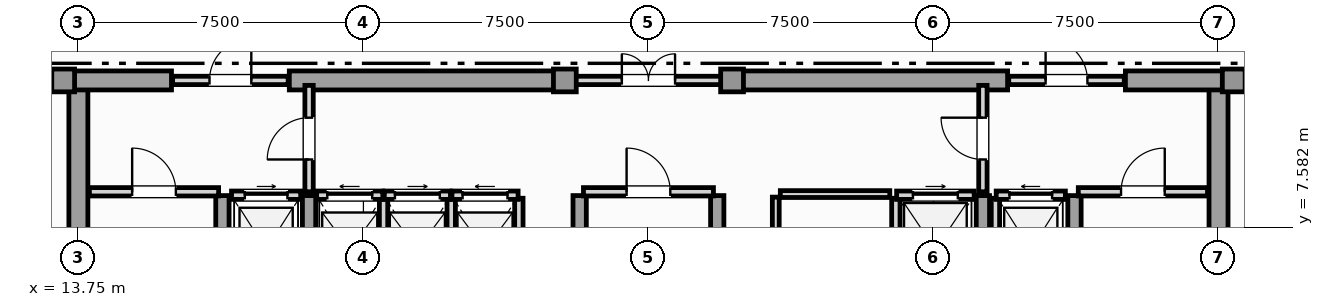
"""IFC4 building model, lengths in metres.
Left out: names, types, materials, properties, quantities, classifications, styles, units other than length and angle.
Written with IfcOpenShell. Run it as: python <this file> out.ifc"""

import sys

from ifc_helpers import new_model, si_unit, direction, frame, frame_2d, origin, origin_2d, place, context, subcontext, project, spatial, rectangle, extrude, element, fill, save


model = new_model("IFC4")
c1 = context("Model", 3, precision=1e-05, world=origin(), true_north=direction((0.0, 1.0)))
c2 = subcontext(c1, "Body", "Model", "MODEL_VIEW")
j1 = project(units=[si_unit("LENGTHUNIT", "METRE"), si_unit("PLANEANGLEUNIT", "RADIAN")], contexts=[c1])
p1 = place(None, origin())
s1 = spatial("IfcSite", under=j1, at=p1, CompositionType="ELEMENT")
p2 = place(p1, origin())
s2 = spatial("IfcBuilding", under=s1, at=p2, CompositionType="ELEMENT")
p3 = place(p2, frame((0.0, 0.0, 308.0)))
s3 = spatial("IfcBuildingStorey", under=s2, at=p3, CompositionType="ELEMENT", Elevation=308.0)
for number, where, z_axis, x_axis in (
    (1, (13.75, 0.92, 0.0), (0.0, 0.0, 1.0), (0.0, 1.0, 0.0)),
    (2, (43.75, 0.92, 0.0), (0.0, 0.0, 1.0), (0.0, 1.0, 0.0)),
):
    element("IfcWall", number, at=place(p3, frame(where, z_axis=z_axis, x_axis=x_axis)), inside=s3, PredefinedType="SHEAR", context=c2, shape_type="SweptSolid", body=[
        extrude(rectangle(XDim=10.53, YDim=0.5, at=frame_2d((5.265, 0.0))), origin(), (0.0, 0.0, 1.0), 4.85),
    ])
p4 = place(p3, frame((13.25, 11.45, 0.0), z_axis=(0.0, 0.0, 1.0), x_axis=(1.0, 0.0, 0.0)))
e3 = element("IfcWall", 3, at=p4, inside=s3, PredefinedType="SHEAR", context=c2, shape_type="SweptSolid", body=[
    extrude(rectangle(XDim=2.95, YDim=0.5, at=frame_2d((1.475, 0.0))), origin(), (0.0, 0.0, 1.0), 4.85),
])
for number, where, z_axis, x_axis in (
    (4, (19.3, 11.45, 0.0), (0.0, 0.0, 1.0), (1.0, 0.0, 0.0)),
    (5, (30.9, 11.45, 0.0), (0.0, 0.0, 1.0), (1.0, 0.0, 0.0)),
):
    element("IfcWall", number, at=place(p3, frame(where, z_axis=z_axis, x_axis=x_axis)), inside=s3, PredefinedType="SHEAR", context=c2, shape_type="SweptSolid", body=[
        extrude(rectangle(XDim=7.3, YDim=0.5, at=frame_2d((3.65, 0.0))), origin(), (0.0, 0.0, 1.0), 4.85),
    ])
p5 = place(p3, frame((41.3, 11.45, 0.0), z_axis=(0.0, 0.0, 1.0), x_axis=(1.0, 0.0, 0.0)))
e6 = element("IfcWall", 6, at=p5, inside=s3, PredefinedType="SHEAR", context=c2, shape_type="SweptSolid", body=[
    extrude(rectangle(XDim=2.95, YDim=0.5, at=frame_2d((1.475, 0.0))), origin(), (0.0, 0.0, 1.0), 4.85),
])
for number, where, z_axis, x_axis in (
    (7, (17.54, 0.92, 0.0), (0.0, 0.0, 1.0), (0.0, 1.0, 0.0)),
    (8, (19.82, 0.92, 0.0), (0.0, 0.0, 1.0), (0.0, 1.0, 0.0)),
    (9, (26.94, 0.92, 0.0), (0.0, 0.0, 1.0), (0.0, 1.0, 0.0)),
    (10, (30.56, 0.92, 0.0), (0.0, 0.0, 1.0), (0.0, 1.0, 0.0)),
    (11, (37.55, 0.92, 0.0), (0.0, 0.0, 1.0), (0.0, 1.0, 0.0)),
    (12, (39.96, 0.92, 0.0), (0.0, 0.0, 1.0), (0.0, 1.0, 0.0)),
):
    element("IfcWall", number, at=place(p3, frame(where, z_axis=z_axis, x_axis=x_axis)), inside=s3, PredefinedType="SHEAR", context=c2, shape_type="SweptSolid", body=[
        extrude(rectangle(XDim=7.5, YDim=0.35, at=frame_2d((3.75, 0.0))), origin(), (0.0, 0.0, 1.0), 4.85),
    ])
for number, where, z_axis, x_axis in (
    (13, (13.35, 11.45, 0.0), (0.0, 0.0, 1.0), (1.0, 0.0, 0.0)),
    (14, (44.15, 11.45, 0.0), (0.0, 0.0, 1.0), (1.0, 0.0, 0.0)),
    (15, (26.55, 11.45, 0.0), (0.0, 0.0, 1.0), (1.0, 0.0, 0.0)),
    (16, (30.95, 11.45, 0.0), (0.0, 0.0, 1.0), (1.0, 0.0, 0.0)),
):
    element("IfcColumn", number, at=place(p3, frame(where, z_axis=z_axis, x_axis=x_axis)), inside=s3, PredefinedType="COLUMN", context=c2, shape_type="SweptSolid", body=[
        extrude(rectangle(XDim=0.6, YDim=0.6, at=origin_2d()), origin(), (0.0, 0.0, 1.0), 5.05),
    ])
p6 = place(p3, frame((17.78, 8.43, 0.0), z_axis=(0.0, 0.0, 1.0), x_axis=(1.0, 0.0, 0.0)))
e17 = element("IfcWall", 17, at=p6, inside=s3, PredefinedType="SOLIDWALL", context=c2, shape_type="SweptSolid", body=[
    extrude(rectangle(XDim=1.82, YDim=0.22, at=frame_2d((0.91, 0.0))), origin(), (0.0, 0.0, 1.0), 4.85),
])
p7 = place(p6, frame((0.35, 0.0, 0.0)))
e18 = element("IfcOpeningElement", 18, at=p7, cuts=e17, PredefinedType="OPENING", context=c2, shape_type="SweptSolid", body=[
    extrude(rectangle(XDim=1.12, YDim=2.25, at=frame_2d((0.56, 1.125))), frame((0.0, 0.12, 0.0), z_axis=(0.0, -1.0, 0.0), x_axis=(1.0, 0.0, 0.0)), (0.0, 0.0, 1.0), 0.24),
])
p8 = place(p3, frame((37.88, 5.65, 0.0), z_axis=(0.0, 0.0, 1.0), x_axis=(0.0, 1.0, 0.0)))
e19 = element("IfcWall", 19, at=p8, inside=s3, PredefinedType="SOLIDWALL", context=c2, shape_type="SweptSolid", body=[
    extrude(rectangle(XDim=2.7, YDim=0.22, at=frame_2d((1.35, 0.0))), origin(), (0.0, 0.0, 1.0), 4.85),
])
p9 = place(p3, frame((37.9, 8.43, 0.0), z_axis=(0.0, 0.0, 1.0), x_axis=(1.0, 0.0, 0.0)))
e20 = element("IfcWall", 20, at=p9, inside=s3, PredefinedType="SOLIDWALL", context=c2, shape_type="SweptSolid", body=[
    extrude(rectangle(XDim=1.82, YDim=0.22, at=frame_2d((0.91, 0.0))), origin(), (0.0, 0.0, 1.0), 4.85),
])
p10 = place(p9, frame((0.35, 0.0, 0.0)))
e21 = element("IfcOpeningElement", 21, at=p10, cuts=e20, PredefinedType="OPENING", context=c2, shape_type="SweptSolid", body=[
    extrude(rectangle(XDim=1.12, YDim=2.25, at=frame_2d((0.56, 1.125))), frame((0.0, 0.12, 0.0), z_axis=(0.0, -1.0, 0.0), x_axis=(1.0, 0.0, 0.0)), (0.0, 0.0, 1.0), 0.24),
])
p11 = place(p3, frame((35.26, 5.65, 0.0), z_axis=(0.0, 0.0, 1.0), x_axis=(0.0, 1.0, 0.0)))
e22 = element("IfcWall", 22, at=p11, inside=s3, PredefinedType="SOLIDWALL", context=c2, shape_type="SweptSolid", body=[
    extrude(rectangle(XDim=2.7, YDim=0.22, at=frame_2d((1.35, 0.0))), origin(), (0.0, 0.0, 1.0), 4.85),
])
p12 = place(p3, frame((35.28, 8.43, 0.0), z_axis=(0.0, 0.0, 1.0), x_axis=(1.0, 0.0, 0.0)))
e23 = element("IfcWall", 23, at=p12, inside=s3, PredefinedType="SOLIDWALL", context=c2, shape_type="SweptSolid", body=[
    extrude(rectangle(XDim=2.04, YDim=0.22, at=frame_2d((1.02, 0.0))), origin(), (0.0, 0.0, 1.0), 4.85),
])
p13 = place(p12, frame((0.43, 0.0, 0.0)))
e24 = element("IfcOpeningElement", 24, at=p13, cuts=e23, PredefinedType="OPENING", context=c2, shape_type="SweptSolid", body=[
    extrude(rectangle(XDim=1.18, YDim=2.2, at=frame_2d((0.59, 1.1))), frame((0.0, 0.12, 0.0), z_axis=(0.0, -1.0, 0.0), x_axis=(1.0, 0.0, 0.0)), (0.0, 0.0, 1.0), 0.24),
])
p14 = place(p3, frame((21.78, 5.65, 0.0), z_axis=(0.0, 0.0, 1.0), x_axis=(0.0, 1.0, 0.0)))
e25 = element("IfcWall", 25, at=p14, inside=s3, PredefinedType="SOLIDWALL", context=c2, shape_type="SweptSolid", body=[
    extrude(rectangle(XDim=2.7, YDim=0.22, at=frame_2d((1.35, 0.0))), origin(), (0.0, 0.0, 1.0), 4.85),
])
p15 = place(p3, frame((20.02, 8.43, 0.0), z_axis=(0.0, 0.0, 1.0), x_axis=(1.0, 0.0, 0.0)))
e26 = element("IfcWall", 26, at=p15, inside=s3, PredefinedType="SOLIDWALL", context=c2, shape_type="SweptSolid", body=[
    extrude(rectangle(XDim=1.74, YDim=0.22, at=frame_2d((0.87, 0.0))), origin(), (0.0, 0.0, 1.0), 4.85),
])
p16 = place(p15, frame((0.28, 0.0, 0.0)))
e27 = element("IfcOpeningElement", 27, at=p16, cuts=e26, PredefinedType="OPENING", context=c2, shape_type="SweptSolid", body=[
    extrude(rectangle(XDim=1.18, YDim=2.2, at=frame_2d((0.59, 1.1))), frame((0.0, 0.12, 0.0), z_axis=(0.0, -1.0, 0.0), x_axis=(1.0, 0.0, 0.0)), (0.0, 0.0, 1.0), 0.24),
])
p17 = place(p3, frame((23.56, 5.65, 0.0), z_axis=(0.0, 0.0, 1.0), x_axis=(0.0, 1.0, 0.0)))
e28 = element("IfcWall", 28, at=p17, inside=s3, PredefinedType="SOLIDWALL", context=c2, shape_type="SweptSolid", body=[
    extrude(rectangle(XDim=2.7, YDim=0.22, at=frame_2d((1.35, 0.0))), origin(), (0.0, 0.0, 1.0), 4.85),
])
p18 = place(p3, frame((21.8, 8.43, 0.0), z_axis=(0.0, 0.0, 1.0), x_axis=(1.0, 0.0, 0.0)))
e29 = element("IfcWall", 29, at=p18, inside=s3, PredefinedType="SOLIDWALL", context=c2, shape_type="SweptSolid", body=[
    extrude(rectangle(XDim=1.74, YDim=0.22, at=frame_2d((0.87, 0.0))), origin(), (0.0, 0.0, 1.0), 4.85),
])
p19 = place(p18, frame((0.28, 0.0, 0.0)))
e30 = element("IfcOpeningElement", 30, at=p19, cuts=e29, PredefinedType="OPENING", context=c2, shape_type="SweptSolid", body=[
    extrude(rectangle(XDim=1.18, YDim=2.2, at=frame_2d((0.59, 1.1))), frame((0.0, 0.12, 0.0), z_axis=(0.0, -1.0, 0.0), x_axis=(1.0, 0.0, 0.0)), (0.0, 0.0, 1.0), 0.24),
])
p20 = place(p3, frame((25.34, 5.65, 0.0), z_axis=(0.0, 0.0, 1.0), x_axis=(0.0, 1.0, 0.0)))
e31 = element("IfcWall", 31, at=p20, inside=s3, PredefinedType="SOLIDWALL", context=c2, shape_type="SweptSolid", body=[
    extrude(rectangle(XDim=2.7, YDim=0.22, at=frame_2d((1.35, 0.0))), origin(), (0.0, 0.0, 1.0), 4.85),
])
p21 = place(p3, frame((23.58, 8.43, 0.0), z_axis=(0.0, 0.0, 1.0), x_axis=(1.0, 0.0, 0.0)))
e32 = element("IfcWall", 32, at=p21, inside=s3, PredefinedType="SOLIDWALL", context=c2, shape_type="SweptSolid", body=[
    extrude(rectangle(XDim=1.74, YDim=0.22, at=frame_2d((0.87, 0.0))), origin(), (0.0, 0.0, 1.0), 4.85),
])
p22 = place(p21, frame((0.28, 0.0, 0.0)))
e33 = element("IfcOpeningElement", 33, at=p22, cuts=e32, PredefinedType="OPENING", context=c2, shape_type="SweptSolid", body=[
    extrude(rectangle(XDim=1.18, YDim=2.2, at=frame_2d((0.59, 1.1))), frame((0.0, 0.12, 0.0), z_axis=(0.0, -1.0, 0.0), x_axis=(1.0, 0.0, 0.0)), (0.0, 0.0, 1.0), 0.24),
])
p23 = place(p3, frame((14.04, 8.52, 0.0), z_axis=(0.0, 0.0, 1.0), x_axis=(1.0, 0.0, 0.0)))
e34 = element("IfcWall", 34, at=p23, inside=s3, PredefinedType="SOLIDWALL", context=c2, shape_type="SweptSolid", body=[
    extrude(rectangle(XDim=3.4, YDim=0.22, at=frame_2d((1.7, 0.0))), origin(), (0.0, 0.0, 1.0), 4.85),
])
p24 = place(p23, frame((1.125, 0.0, 0.0)))
e35 = element("IfcOpeningElement", 35, at=p24, cuts=e34, PredefinedType="OPENING", context=c2, shape_type="SweptSolid", body=[
    extrude(rectangle(XDim=1.15, YDim=2.2, at=frame_2d((0.575, 1.1))), frame((0.0, 0.12, 0.0), z_axis=(0.0, -1.0, 0.0), x_axis=(1.0, 0.0, 0.0)), (0.0, 0.0, 1.0), 0.24),
])
p25 = place(p3, frame((40.06, 8.52, 0.0), z_axis=(0.0, 0.0, 1.0), x_axis=(1.0, 0.0, 0.0)))
e36 = element("IfcWall", 36, at=p25, inside=s3, PredefinedType="SOLIDWALL", context=c2, shape_type="SweptSolid", body=[
    extrude(rectangle(XDim=3.4, YDim=0.22, at=frame_2d((1.7, 0.0))), origin(), (0.0, 0.0, 1.0), 4.85),
])
p26 = place(p25, frame((1.125, 0.0, 0.0)))
e37 = element("IfcOpeningElement", 37, at=p26, cuts=e36, PredefinedType="OPENING", context=c2, shape_type="SweptSolid", body=[
    extrude(rectangle(XDim=1.15, YDim=2.2, at=frame_2d((0.575, 1.1))), frame((0.0, 0.12, 0.0), z_axis=(0.0, -1.0, 0.0), x_axis=(1.0, 0.0, 0.0)), (0.0, 0.0, 1.0), 0.24),
])
p27 = place(p3, frame((27.04, 8.52, 0.0), z_axis=(0.0, 0.0, 1.0), x_axis=(1.0, 0.0, 0.0)))
e38 = element("IfcWall", 38, at=p27, inside=s3, PredefinedType="SOLIDWALL", context=c2, shape_type="SweptSolid", body=[
    extrude(rectangle(XDim=3.42, YDim=0.22, at=frame_2d((1.71, 0.0))), origin(), (0.0, 0.0, 1.0), 4.85),
])
p28 = place(p27, frame((1.135, 0.0, 0.0)))
e39 = element("IfcOpeningElement", 39, at=p28, cuts=e38, PredefinedType="OPENING", context=c2, shape_type="SweptSolid", body=[
    extrude(rectangle(XDim=1.15, YDim=2.2, at=frame_2d((0.575, 1.1))), frame((0.0, 0.12, 0.0), z_axis=(0.0, -1.0, 0.0), x_axis=(1.0, 0.0, 0.0)), (0.0, 0.0, 1.0), 0.24),
])
p29 = place(p3, frame((19.82, 8.52, 0.0), z_axis=(0.0, 0.0, 1.0), x_axis=(0.0, 1.0, 0.0)))
e40 = element("IfcWall", 40, at=p29, inside=s3, PredefinedType="SOLIDWALL", context=c2, shape_type="SweptSolid", body=[
    extrude(rectangle(XDim=2.8, YDim=0.22, at=frame_2d((1.4, 0.0))), origin(), (0.0, 0.0, 1.0), 4.305),
])
p30 = place(p29, frame((0.85, 0.0, 0.0)))
e41 = element("IfcOpeningElement", 41, at=p30, cuts=e40, PredefinedType="OPENING", context=c2, shape_type="SweptSolid", body=[
    extrude(rectangle(XDim=1.1, YDim=2.2, at=frame_2d((0.55, 1.1))), frame((0.0, 0.12, 0.0), z_axis=(0.0, -1.0, 0.0), x_axis=(1.0, 0.0, 0.0)), (0.0, 0.0, 1.0), 0.24),
])
p31 = place(p3, frame((37.55, 8.52, 0.0), z_axis=(0.0, 0.0, 1.0), x_axis=(0.0, 1.0, 0.0)))
e42 = element("IfcWall", 42, at=p31, inside=s3, PredefinedType="SOLIDWALL", context=c2, shape_type="SweptSolid", body=[
    extrude(rectangle(XDim=2.8, YDim=0.22, at=frame_2d((1.4, 0.0))), origin(), (0.0, 0.0, 1.0), 4.305),
])
p32 = place(p31, frame((0.85, 0.0, 0.0)))
e43 = element("IfcOpeningElement", 43, at=p32, cuts=e42, PredefinedType="OPENING", context=c2, shape_type="SweptSolid", body=[
    extrude(rectangle(XDim=1.1, YDim=2.2, at=frame_2d((0.55, 1.1))), frame((0.0, 0.12, 0.0), z_axis=(0.0, -1.0, 0.0), x_axis=(1.0, 0.0, 0.0)), (0.0, 0.0, 1.0), 0.24),
])
p33 = place(p3, frame((16.23, 11.45, 0.0), z_axis=(0.0, 0.0, 1.0), x_axis=(1.0, 0.0, 0.0)))
e44 = element("IfcWall", 44, at=p33, inside=s3, PredefinedType="SOLIDWALL", context=c2, shape_type="SweptSolid", body=[
    extrude(rectangle(XDim=3.04, YDim=0.22, at=frame_2d((1.52, 0.0))), origin(), (0.0, 0.0, 1.0), 4.85),
])
p34 = place(p33, frame((0.97, 0.0, 0.0)))
e45 = element("IfcOpeningElement", 45, at=p34, cuts=e44, PredefinedType="OPENING", context=c2, shape_type="SweptSolid", body=[
    extrude(rectangle(XDim=1.1, YDim=2.2, at=frame_2d((0.55, 1.1))), frame((0.0, 0.12, 0.0), z_axis=(0.0, -1.0, 0.0), x_axis=(1.0, 0.0, 0.0)), (0.0, 0.0, 1.0), 0.24),
])
p35 = place(p3, frame((26.63, 11.45, 0.0), z_axis=(0.0, 0.0, 1.0), x_axis=(1.0, 0.0, 0.0)))
e46 = element("IfcWall", 46, at=p35, inside=s3, PredefinedType="SOLIDWALL", context=c2, shape_type="SweptSolid", body=[
    extrude(rectangle(XDim=4.24, YDim=0.22, at=frame_2d((2.12, 0.0))), origin(), (0.0, 0.0, 1.0), 4.85),
])
p36 = place(p35, frame((1.42, 0.0, 0.0)))
e47 = element("IfcOpeningElement", 47, at=p36, cuts=e46, PredefinedType="OPENING", context=c2, shape_type="SweptSolid", body=[
    extrude(rectangle(XDim=1.4, YDim=2.2, at=frame_2d((0.7, 1.1))), frame((0.0, 0.12, 0.0), z_axis=(0.0, -1.0, 0.0), x_axis=(1.0, 0.0, 0.0)), (0.0, 0.0, 1.0), 0.24),
])
p37 = place(p3, frame((38.23, 11.45, 0.0), z_axis=(0.0, 0.0, 1.0), x_axis=(1.0, 0.0, 0.0)))
e48 = element("IfcWall", 48, at=p37, inside=s3, PredefinedType="SOLIDWALL", context=c2, shape_type="SweptSolid", body=[
    extrude(rectangle(XDim=3.04, YDim=0.22, at=frame_2d((1.52, 0.0))), origin(), (0.0, 0.0, 1.0), 4.85),
])
p38 = place(p37, frame((0.97, 0.0, 0.0)))
e49 = element("IfcOpeningElement", 49, at=p38, cuts=e48, PredefinedType="OPENING", context=c2, shape_type="SweptSolid", body=[
    extrude(rectangle(XDim=1.1, YDim=2.2, at=frame_2d((0.55, 1.1))), frame((0.0, 0.12, 0.0), z_axis=(0.0, -1.0, 0.0), x_axis=(1.0, 0.0, 0.0)), (0.0, 0.0, 1.0), 0.24),
])
p39 = place(p3, frame((32.1, 5.65, 0.0), z_axis=(0.0, 0.0, 1.0), x_axis=(0.0, 1.0, 0.0)))
e50 = element("IfcWall", 50, at=p39, inside=s3, PredefinedType="PARTITIONING", context=c2, shape_type="SweptSolid", body=[
    extrude(rectangle(XDim=2.73, YDim=0.18, at=frame_2d((1.365, 0.0))), origin(), (0.0, 0.0, 1.0), 4.85),
])
p40 = place(p39, frame((0.84, 0.0, 0.0)))
e51 = element("IfcOpeningElement", 51, at=p40, cuts=e50, PredefinedType="OPENING", context=c2, shape_type="SweptSolid", body=[
    extrude(rectangle(XDim=1.05, YDim=2.15, at=frame_2d((0.525, 1.075))), frame((0.0, 0.1, 0.0), z_axis=(0.0, -1.0, 0.0), x_axis=(1.0, 0.0, 0.0)), (0.0, 0.0, 1.0), 0.2),
])
p41 = place(p3, frame((32.22, 8.46, 0.0), z_axis=(0.0, 0.0, 1.0), x_axis=(1.0, 0.0, 0.0)))
e52 = element("IfcWall", 52, at=p41, inside=s3, PredefinedType="PARTITIONING", context=c2, shape_type="SweptSolid", body=[
    extrude(rectangle(XDim=2.88, YDim=0.18, at=frame_2d((1.44, 0.0))), origin(), (0.0, 0.0, 1.0), 4.85),
])
p42 = place(p3, frame((9.0, 11.6, 0.0), z_axis=(0.0, 0.0, 1.0), x_axis=(1.0, 0.0, 0.0)))
e53 = element("IfcWall", 53, at=p42, inside=s3, PredefinedType="PARTITIONING", context=c2, shape_type="SweptSolid", body=[
    extrude(rectangle(XDim=4.145, YDim=0.18, at=frame_2d((2.072, 0.0))), origin(), (0.0, 0.0, 1.0), 4.85),
])
p43 = place(p42, frame((1.573, 0.0, 0.0)))
e54 = element("IfcOpeningElement", 54, at=p43, cuts=e53, PredefinedType="OPENING", context=c2, shape_type="SweptSolid", body=[
    extrude(rectangle(XDim=1.0, YDim=2.15, at=frame_2d((0.5, 1.075))), frame((0.0, 0.1, 0.0), z_axis=(0.0, -1.0, 0.0), x_axis=(1.0, 0.0, 0.0)), (0.0, 0.0, 1.0), 0.2),
])
p44 = place(p3, frame((44.355, 11.6, 0.0), z_axis=(0.0, 0.0, 1.0), x_axis=(1.0, 0.0, 0.0)))
e55 = element("IfcWall", 55, at=p44, inside=s3, PredefinedType="PARTITIONING", context=c2, shape_type="SweptSolid", body=[
    extrude(rectangle(XDim=4.145, YDim=0.18, at=frame_2d((2.072, 0.0))), origin(), (0.0, 0.0, 1.0), 4.85),
])
p45 = place(p44, frame((1.573, 0.0, 0.0)))
e56 = element("IfcOpeningElement", 56, at=p45, cuts=e55, PredefinedType="OPENING", context=c2, shape_type="SweptSolid", body=[
    extrude(rectangle(XDim=1.0, YDim=2.15, at=frame_2d((0.5, 1.075))), frame((0.0, 0.1, 0.0), z_axis=(0.0, -1.0, 0.0), x_axis=(1.0, 0.0, 0.0)), (0.0, 0.0, 1.0), 0.2),
])
p46 = place(p7, origin())
e57 = element("IfcDoor", 57, at=p46, inside=s3, OperationType="SLIDING_TO_RIGHT", PredefinedType="DOOR", context=c2, shape_type="SweptSolid", body=[
    extrude(rectangle(XDim=1.12, YDim=2.25, at=frame_2d((0.56, 1.125))), frame((0.0, 0.025, 0.0), z_axis=(0.0, -1.0, 0.0), x_axis=(1.0, 0.0, 0.0)), (0.0, 0.0, 1.0), 0.05),
])
fill(e18, e57)
p47 = place(p10, origin())
e58 = element("IfcDoor", 58, at=p47, inside=s3, OperationType="SLIDING_TO_LEFT", PredefinedType="DOOR", context=c2, shape_type="SweptSolid", body=[
    extrude(rectangle(XDim=1.12, YDim=2.25, at=frame_2d((0.56, 1.125))), frame((0.0, 0.025, 0.0), z_axis=(0.0, -1.0, 0.0), x_axis=(1.0, 0.0, 0.0)), (0.0, 0.0, 1.0), 0.05),
])
fill(e21, e58)
p48 = place(p13, origin())
e59 = element("IfcDoor", 59, at=p48, inside=s3, OperationType="SLIDING_TO_RIGHT", PredefinedType="DOOR", context=c2, shape_type="SweptSolid", body=[
    extrude(rectangle(XDim=1.18, YDim=2.2, at=frame_2d((0.59, 1.1))), frame((0.0, 0.025, 0.0), z_axis=(0.0, -1.0, 0.0), x_axis=(1.0, 0.0, 0.0)), (0.0, 0.0, 1.0), 0.05),
])
fill(e24, e59)
p49 = place(p16, origin())
e60 = element("IfcDoor", 60, at=p49, inside=s3, OperationType="SLIDING_TO_LEFT", PredefinedType="DOOR", context=c2, shape_type="SweptSolid", body=[
    extrude(rectangle(XDim=1.18, YDim=2.2, at=frame_2d((0.59, 1.1))), frame((0.0, 0.025, 0.0), z_axis=(0.0, -1.0, 0.0), x_axis=(1.0, 0.0, 0.0)), (0.0, 0.0, 1.0), 0.05),
])
fill(e27, e60)
p50 = place(p19, origin())
e61 = element("IfcDoor", 61, at=p50, inside=s3, OperationType="SLIDING_TO_RIGHT", PredefinedType="DOOR", context=c2, shape_type="SweptSolid", body=[
    extrude(rectangle(XDim=1.18, YDim=2.2, at=frame_2d((0.59, 1.1))), frame((0.0, 0.025, 0.0), z_axis=(0.0, -1.0, 0.0), x_axis=(1.0, 0.0, 0.0)), (0.0, 0.0, 1.0), 0.05),
])
fill(e30, e61)
p51 = place(p22, origin())
e62 = element("IfcDoor", 62, at=p51, inside=s3, OperationType="SLIDING_TO_LEFT", PredefinedType="DOOR", context=c2, shape_type="SweptSolid", body=[
    extrude(rectangle(XDim=1.18, YDim=2.2, at=frame_2d((0.59, 1.1))), frame((0.0, 0.025, 0.0), z_axis=(0.0, -1.0, 0.0), x_axis=(1.0, 0.0, 0.0)), (0.0, 0.0, 1.0), 0.05),
])
fill(e33, e62)
p52 = place(p24, origin())
e63 = element("IfcDoor", 63, at=p52, inside=s3, OperationType="SINGLE_SWING_LEFT", PredefinedType="DOOR", context=c2, shape_type="SweptSolid", body=[
    extrude(rectangle(XDim=1.15, YDim=2.2, at=frame_2d((0.575, 1.1))), frame((0.0, 0.025, 0.0), z_axis=(0.0, -1.0, 0.0), x_axis=(1.0, 0.0, 0.0)), (0.0, 0.0, 1.0), 0.05),
])
fill(e35, e63)
p53 = place(p26, origin())
e64 = element("IfcDoor", 64, at=p53, inside=s3, OperationType="SINGLE_SWING_RIGHT", PredefinedType="DOOR", context=c2, shape_type="SweptSolid", body=[
    extrude(rectangle(XDim=1.15, YDim=2.2, at=frame_2d((0.575, 1.1))), frame((0.0, 0.025, 0.0), z_axis=(0.0, -1.0, 0.0), x_axis=(1.0, 0.0, 0.0)), (0.0, 0.0, 1.0), 0.05),
])
fill(e37, e64)
p54 = place(p28, origin())
e65 = element("IfcDoor", 65, at=p54, inside=s3, OperationType="SINGLE_SWING_LEFT", PredefinedType="DOOR", context=c2, shape_type="SweptSolid", body=[
    extrude(rectangle(XDim=1.15, YDim=2.2, at=frame_2d((0.575, 1.1))), frame((0.0, 0.025, 0.0), z_axis=(0.0, -1.0, 0.0), x_axis=(1.0, 0.0, 0.0)), (0.0, 0.0, 1.0), 0.05),
])
fill(e39, e65)
p55 = place(p30, origin())
e66 = element("IfcDoor", 66, at=p55, inside=s3, OperationType="SINGLE_SWING_LEFT", PredefinedType="DOOR", context=c2, shape_type="SweptSolid", body=[
    extrude(rectangle(XDim=1.1, YDim=2.2, at=frame_2d((0.55, 1.1))), frame((0.0, 0.025, 0.0), z_axis=(0.0, -1.0, 0.0), x_axis=(1.0, 0.0, 0.0)), (0.0, 0.0, 1.0), 0.05),
])
fill(e41, e66)
p56 = place(p32, origin())
e67 = element("IfcDoor", 67, at=p56, inside=s3, OperationType="SINGLE_SWING_RIGHT", PredefinedType="DOOR", context=c2, shape_type="SweptSolid", body=[
    extrude(rectangle(XDim=1.1, YDim=2.2, at=frame_2d((0.55, 1.1))), frame((0.0, 0.025, 0.0), z_axis=(0.0, -1.0, 0.0), x_axis=(1.0, 0.0, 0.0)), (0.0, 0.0, 1.0), 0.05),
])
fill(e43, e67)
p57 = place(p34, origin())
e68 = element("IfcDoor", 68, at=p57, inside=s3, OperationType="SINGLE_SWING_RIGHT", PredefinedType="DOOR", context=c2, shape_type="SweptSolid", body=[
    extrude(rectangle(XDim=1.1, YDim=2.2, at=frame_2d((0.55, 1.1))), frame((0.0, 0.025, 0.0), z_axis=(0.0, -1.0, 0.0), x_axis=(1.0, 0.0, 0.0)), (0.0, 0.0, 1.0), 0.05),
])
fill(e45, e68)
p58 = place(p36, origin())
e69 = element("IfcDoor", 69, at=p58, inside=s3, OperationType="DOUBLE_DOOR_SINGLE_SWING", PredefinedType="DOOR", context=c2, shape_type="SweptSolid", body=[
    extrude(rectangle(XDim=1.4, YDim=2.2, at=frame_2d((0.7, 1.1))), frame((0.0, 0.025, 0.0), z_axis=(0.0, -1.0, 0.0), x_axis=(1.0, 0.0, 0.0)), (0.0, 0.0, 1.0), 0.05),
])
fill(e47, e69)
p59 = place(p38, origin())
e70 = element("IfcDoor", 70, at=p59, inside=s3, OperationType="SINGLE_SWING_LEFT", PredefinedType="DOOR", context=c2, shape_type="SweptSolid", body=[
    extrude(rectangle(XDim=1.1, YDim=2.2, at=frame_2d((0.55, 1.1))), frame((0.0, 0.025, 0.0), z_axis=(0.0, -1.0, 0.0), x_axis=(1.0, 0.0, 0.0)), (0.0, 0.0, 1.0), 0.05),
])
fill(e49, e70)
save(model, sys.argv[1])
